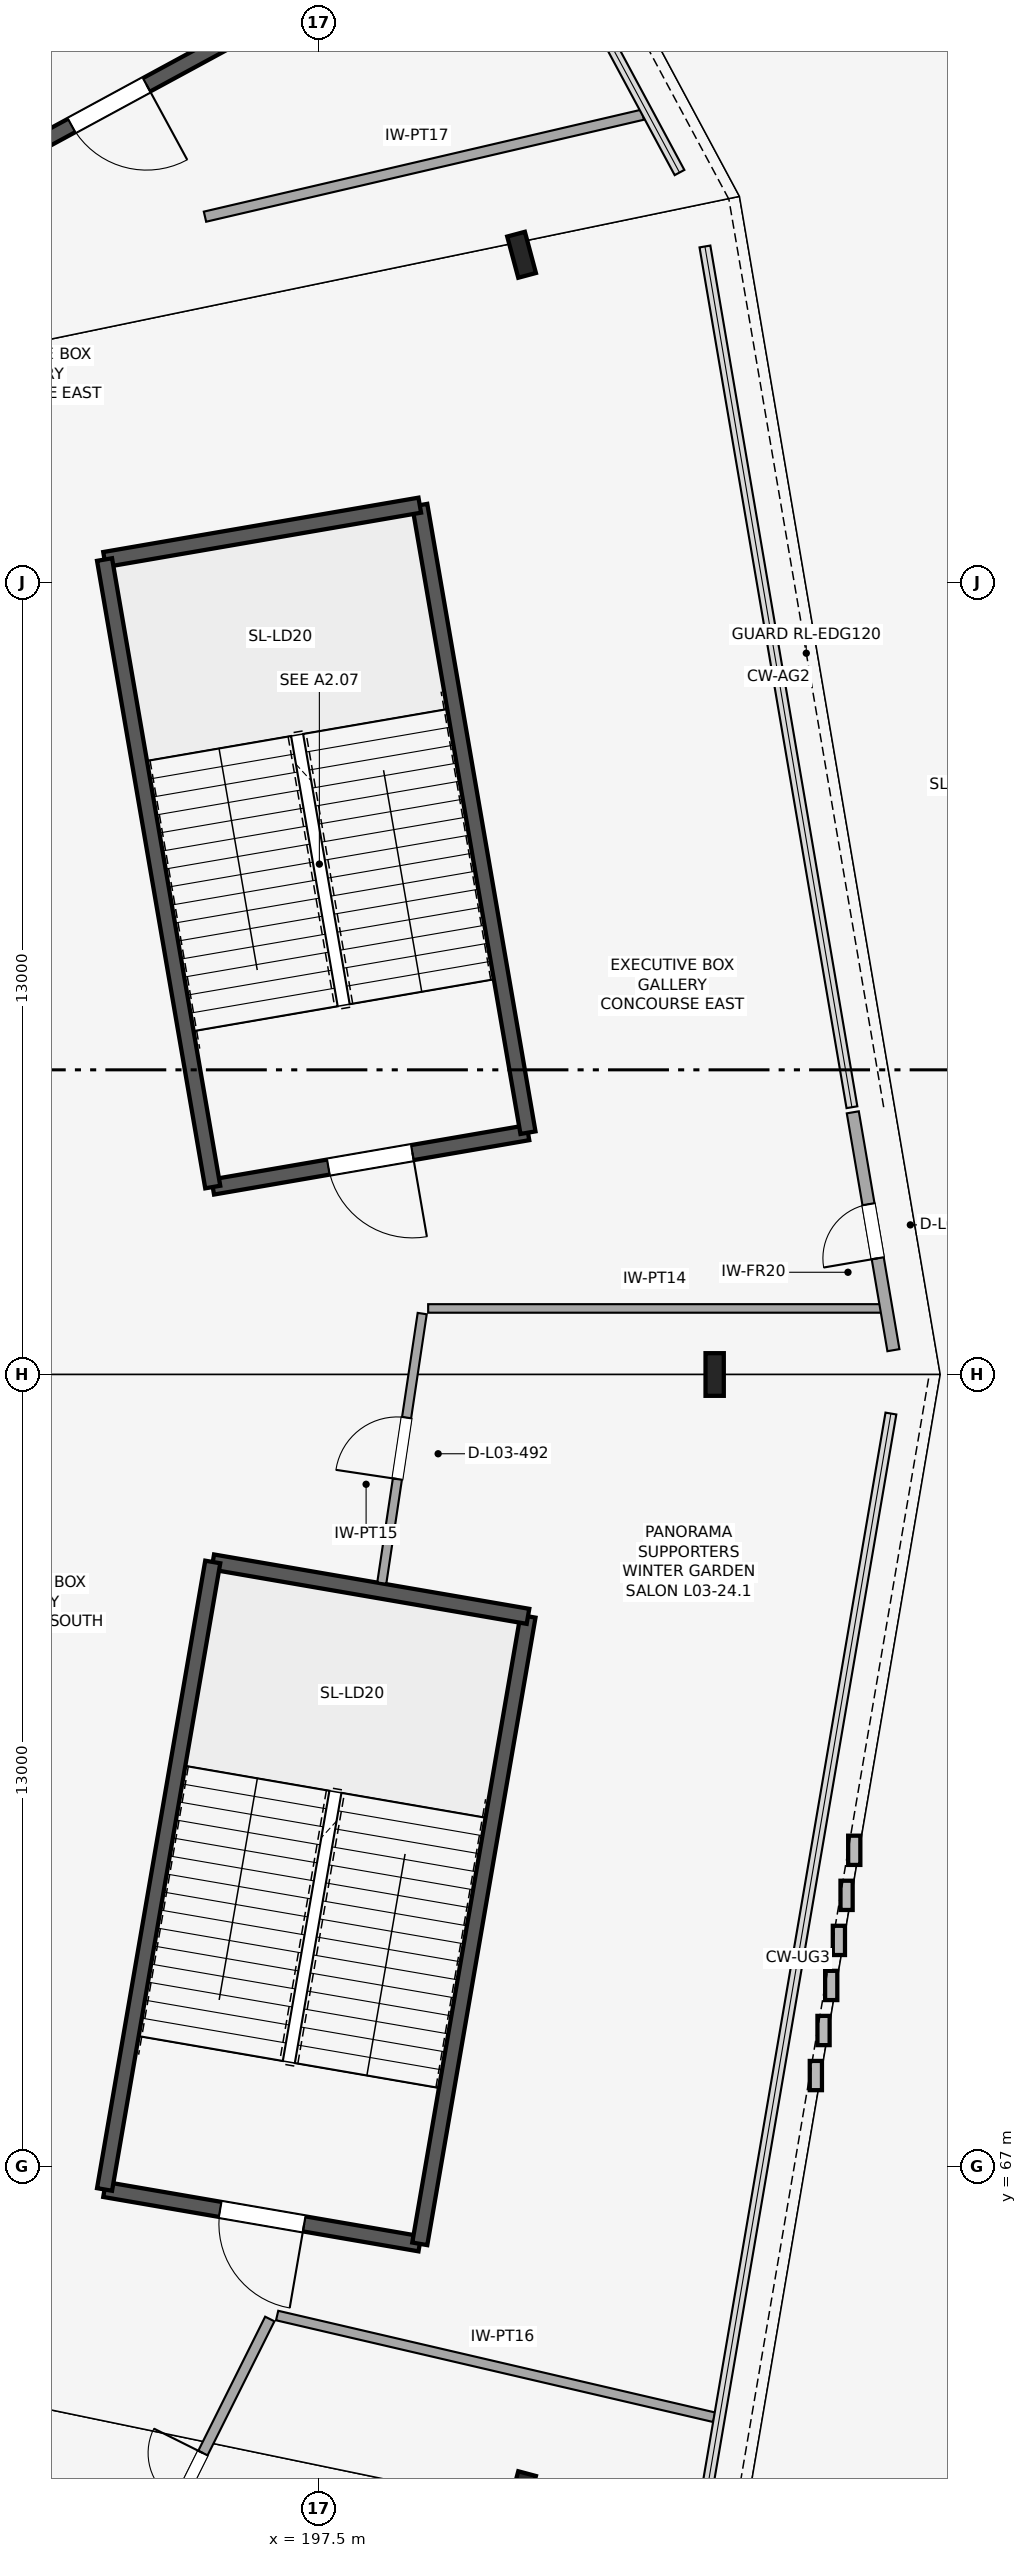
"""IFC4 building model, lengths in metres.
Left out: names, types, materials, properties, quantities, classifications, styles, units other than length and angle.
Written with IfcOpenShell. Run it as: python <this file> out.ifc"""

import sys

from ifc_helpers import new_model, si_unit, direction, frame, frame_2d, origin, origin_2d, place, context, subcontext, project, spatial, rectangle, i_section, extrude, element, fill, save


model = new_model("IFC4")
c1 = context("Model", 3, precision=1e-05, world=origin(), true_north=direction((0.0, 1.0)))
c2 = subcontext(c1, "Body", "Model", "MODEL_VIEW")
j1 = project(units=[si_unit("LENGTHUNIT", "METRE"), si_unit("PLANEANGLEUNIT", "RADIAN")], contexts=[c1])
p1 = place(None, origin())
s1 = spatial("IfcSite", under=j1, at=p1, CompositionType="ELEMENT")
p2 = place(p1, origin())
s2 = spatial("IfcBuilding", under=s1, at=p2, CompositionType="ELEMENT")
p3 = place(p2, frame((0.0, 0.0, 15.6)))
s3 = spatial("IfcBuildingStorey", under=s2, at=p3, CompositionType="ELEMENT", Elevation=15.6)
for number, where, z_axis, x_axis in (
    (1, (204.0, 80.0, 0.0), (0.0, 0.0, 1.0), (1.0, 0.0, 0.0)),
    (2, (200.831, 98.376, 0.0), (0.0, 0.0, 1.0), (0.966, 0.259, 0.0)),
    (3, (200.831, 61.624, 0.0), (0.0, 0.0, 1.0), (0.966, -0.259, 0.0)),
):
    element("IfcColumn", number, at=place(p3, frame(where, z_axis=z_axis, x_axis=x_axis)), inside=s3, PredefinedType="COLUMN", context=c2, shape_type="SweptSolid", body=[
        extrude(i_section(OverallWidth=0.3, OverallDepth=0.7, WebThickness=0.017, FlangeThickness=0.032, FilletRadius=0.027, at=origin_2d()), origin(), (0.0, 0.0, 1.0), 5.2),
    ])
p4 = place(p3, frame((195.762, 83.077, 0.0), z_axis=(0.0, 0.0, 1.0), x_axis=(0.985457162135, 0.16992404655, 0.0)))
e4 = element("IfcWall", 4, at=p4, inside=s3, PredefinedType="SHEAR", context=c2, shape_type="SweptSolid", body=[
    extrude(rectangle(XDim=5.25, YDim=0.25, at=frame_2d((2.625, 0.0))), origin(), (0.0, 0.0, 1.0), 4.9),
])
p5 = place(p4, frame((1.925, 0.0, 0.0)))
e5 = element("IfcOpeningElement", 5, at=p5, cuts=e4, PredefinedType="OPENING", context=c2, shape_type="SweptSolid", body=[
    extrude(rectangle(XDim=1.4, YDim=2.2, at=frame_2d((0.7, 1.1))), frame((0.0, 0.135, 0.0), z_axis=(0.0, -1.0, 0.0), x_axis=(1.0, 0.0, 0.0)), (0.0, 0.0, 1.0), 0.27),
])
p6 = place(p3, frame((200.936, 83.969, 0.0), z_axis=(0.0, 0.0, 1.0), x_axis=(-0.169938992676, 0.985454584833, 0.0)))
e6 = element("IfcWall", 6, at=p6, inside=s3, PredefinedType="SHEAR", context=c2, shape_type="SweptSolid", body=[
    extrude(rectangle(XDim=10.45, YDim=0.25, at=frame_2d((5.225, 0.0))), origin(), (0.0, 0.0, 1.0), 4.9),
])
p7 = place(p3, frame((199.16, 94.267, 0.0), z_axis=(0.0, 0.0, 1.0), x_axis=(-0.985457162135, -0.16992404655, 0.0)))
e7 = element("IfcWall", 7, at=p7, inside=s3, PredefinedType="SHEAR", context=c2, shape_type="SweptSolid", body=[
    extrude(rectangle(XDim=5.25, YDim=0.25, at=frame_2d((2.625, 0.0))), origin(), (0.0, 0.0, 1.0), 4.9),
])
p8 = place(p3, frame((193.987, 93.375, 0.0), z_axis=(0.0, 0.0, 1.0), x_axis=(0.169938992676, -0.985454584833, 0.0)))
e8 = element("IfcWall", 8, at=p8, inside=s3, PredefinedType="SHEAR", context=c2, shape_type="SweptSolid", body=[
    extrude(rectangle(XDim=10.45, YDim=0.25, at=frame_2d((5.225, 0.0))), origin(), (0.0, 0.0, 1.0), 4.9),
])
p9 = place(p3, frame((191.754, 99.58, 0.0), z_axis=(0.0, 0.0, 1.0), x_axis=(0.878961487093, 0.47689275965, 0.0)))
e9 = element("IfcWall", 9, at=p9, inside=s3, PredefinedType="SHEAR", context=c2, shape_type="SweptSolid", body=[
    extrude(rectangle(XDim=5.25, YDim=0.25, at=frame_2d((2.625, 0.0))), origin(), (0.0, 0.0, 1.0), 4.9),
])
p10 = place(p9, frame((1.925, 0.0, 0.0)))
e10 = element("IfcOpeningElement", 10, at=p10, cuts=e9, PredefinedType="OPENING", context=c2, shape_type="SweptSolid", body=[
    extrude(rectangle(XDim=1.4, YDim=2.2, at=frame_2d((0.7, 1.1))), frame((0.0, 0.135, 0.0), z_axis=(0.0, -1.0, 0.0), x_axis=(1.0, 0.0, 0.0)), (0.0, 0.0, 1.0), 0.27),
])
p11 = place(p3, frame((193.987, 66.625, 0.0), z_axis=(0.0, 0.0, 1.0), x_axis=(0.985457162135, -0.16992404655, 0.0)))
e11 = element("IfcWall", 11, at=p11, inside=s3, PredefinedType="SHEAR", context=c2, shape_type="SweptSolid", body=[
    extrude(rectangle(XDim=5.25, YDim=0.25, at=frame_2d((2.625, 0.0))), origin(), (0.0, 0.0, 1.0), 4.9),
])
p12 = place(p11, frame((1.925, 0.0, 0.0)))
e12 = element("IfcOpeningElement", 12, at=p12, cuts=e11, PredefinedType="OPENING", context=c2, shape_type="SweptSolid", body=[
    extrude(rectangle(XDim=1.4, YDim=2.2, at=frame_2d((0.7, 1.1))), frame((0.0, 0.135, 0.0), z_axis=(0.0, -1.0, 0.0), x_axis=(1.0, 0.0, 0.0)), (0.0, 0.0, 1.0), 0.27),
])
p13 = place(p3, frame((199.16, 65.733, 0.0), z_axis=(0.0, 0.0, 1.0), x_axis=(0.169938992676, 0.985454584833, 0.0)))
e13 = element("IfcWall", 13, at=p13, inside=s3, PredefinedType="SHEAR", context=c2, shape_type="SweptSolid", body=[
    extrude(rectangle(XDim=10.45, YDim=0.25, at=frame_2d((5.225, 0.0))), origin(), (0.0, 0.0, 1.0), 4.9),
])
p14 = place(p3, frame((200.936, 76.031, 0.0), z_axis=(0.0, 0.0, 1.0), x_axis=(-0.985458504796, 0.169916259745, 0.0)))
e14 = element("IfcWall", 14, at=p14, inside=s3, PredefinedType="SHEAR", context=c2, shape_type="SweptSolid", body=[
    extrude(rectangle(XDim=5.25, YDim=0.25, at=frame_2d((2.625, 0.0))), origin(), (0.0, 0.0, 1.0), 4.9),
])
p15 = place(p3, frame((195.762, 76.923, 0.0), z_axis=(0.0, 0.0, 1.0), x_axis=(-0.16991630471, -0.985458497043, 0.0)))
e15 = element("IfcWall", 15, at=p15, inside=s3, PredefinedType="SHEAR", context=c2, shape_type="SweptSolid", body=[
    extrude(rectangle(XDim=10.45, YDim=0.25, at=frame_2d((5.225, 0.0))), origin(), (0.0, 0.0, 1.0), 4.9),
])
p16 = place(p3, frame((195.635, 99.001, 0.0), z_axis=(0.0, 0.0, 1.0), x_axis=(0.973918293812, 0.226899001712, 0.0)))
e16 = element("IfcWall", 16, at=p16, inside=s3, PredefinedType="PARTITIONING", context=c2, shape_type="SweptSolid", body=[
    extrude(rectangle(XDim=7.377, YDim=0.17, at=frame_2d((3.688, 0.0))), origin(), (0.0, 0.0, 1.0), 2.45),
])
p17 = place(p3, frame((194.102, 59.294, 0.0), z_axis=(0.0, 0.0, 1.0), x_axis=(0.44637403409, 0.894846479397, 0.0)))
e17 = element("IfcWall", 17, at=p17, inside=s3, PredefinedType="PARTITIONING", context=c2, shape_type="SweptSolid", body=[
    extrude(rectangle(XDim=5.817, YDim=0.17, at=frame_2d((2.909, 0.0))), origin(), (0.0, 0.0, 1.0), 2.45),
])
p18 = place(p17, frame((2.459, 0.0, 0.0)))
e18 = element("IfcOpeningElement", 18, at=p18, cuts=e17, PredefinedType="OPENING", context=c2, shape_type="SweptSolid", body=[
    extrude(rectangle(XDim=0.9, YDim=2.24, at=frame_2d((0.45, 1.12))), frame((0.0, 0.095, 0.0), z_axis=(0.0, -1.0, 0.0), x_axis=(1.0, 0.0, 0.0)), (0.0, 0.0, 1.0), 0.19),
])
p19 = place(p3, frame((196.819, 64.556, 0.0), z_axis=(0.0, 0.0, 1.0), x_axis=(0.973969408775, -0.22667948908, 0.0)))
e19 = element("IfcWall", 19, at=p19, inside=s3, PredefinedType="PARTITIONING", context=c2, shape_type="SweptSolid", body=[
    extrude(rectangle(XDim=7.366, YDim=0.16, at=frame_2d((3.683, 0.0))), origin(), (0.0, 0.0, 1.0), 2.45),
])
p20 = place(p3, frame((198.537, 76.577, 0.0), z_axis=(0.0, 0.0, 1.0), x_axis=(0.148364476021, 0.988932749106, 0.0)))
e20 = element("IfcWall", 20, at=p20, inside=s3, PredefinedType="PARTITIONING", context=c2, shape_type="SweptSolid", body=[
    extrude(rectangle(XDim=4.473, YDim=0.15, at=frame_2d((2.236, 0.0))), origin(), (0.0, 0.0, 1.0), 2.45),
])
p21 = place(p20, frame((1.726, 0.0, 0.0)))
e21 = element("IfcOpeningElement", 21, at=p21, cuts=e20, PredefinedType="OPENING", context=c2, shape_type="SweptSolid", body=[
    extrude(rectangle(XDim=1.02, YDim=2.24, at=frame_2d((0.51, 1.12))), frame((0.0, 0.085, 0.0), z_axis=(0.0, -1.0, 0.0), x_axis=(1.0, 0.0, 0.0)), (0.0, 0.0, 1.0), 0.17),
])
p22 = place(p3, frame((199.298, 81.084, 0.0), z_axis=(0.0, 0.0, 1.0), x_axis=(0.999999999461, 3.2840722e-05, 0.0)))
e22 = element("IfcWall", 22, at=p22, inside=s3, PredefinedType="PARTITIONING", context=c2, shape_type="SweptSolid", body=[
    extrude(rectangle(XDim=7.434, YDim=0.14, at=frame_2d((3.717, 0.0))), origin(), (0.0, 0.0, 1.0), 2.45),
])
p23 = place(p3, frame((206.934, 80.399, 0.0), z_axis=(0.0, 0.0, 1.0), x_axis=(-0.16836659398, 0.985724449342, 0.0)))
e23 = element("IfcWall", 23, at=p23, inside=s3, PredefinedType="PARTITIONING", context=c2, shape_type="SweptSolid", body=[
    extrude(rectangle(XDim=3.96, YDim=0.2, at=frame_2d((1.98, 0.0))), origin(), (0.0, 0.0, 1.0), 2.45),
])
p24 = place(p23, frame((1.53, 0.0, 0.0)))
e24 = element("IfcOpeningElement", 24, at=p24, cuts=e23, PredefinedType="OPENING", context=c2, shape_type="SweptSolid", body=[
    extrude(rectangle(XDim=0.9, YDim=2.24, at=frame_2d((0.45, 1.12))), frame((0.0, 0.11, 0.0), z_axis=(0.0, -1.0, 0.0), x_axis=(1.0, 0.0, 0.0)), (0.0, 0.0, 1.0), 0.22),
])
p25 = place(p5, frame((1.4, 0.0, 0.0), z_axis=(0.0, 0.0, 1.0), x_axis=(-1.0, 0.0, 0.0)))
e25 = element("IfcDoor", 25, at=p25, inside=s3, OperationType="SINGLE_SWING_LEFT", PredefinedType="DOOR", context=c2, shape_type="SweptSolid", body=[
    extrude(rectangle(XDim=1.4, YDim=2.2, at=frame_2d((0.7, 1.1))), frame((0.0, 0.025, 0.0), z_axis=(0.0, -1.0, 0.0), x_axis=(1.0, 0.0, 0.0)), (0.0, 0.0, 1.0), 0.05),
])
fill(e5, e25)
p26 = place(p10, frame((1.4, 0.0, 0.0), z_axis=(0.0, 0.0, 1.0), x_axis=(-1.0, 0.0, 0.0)))
e26 = element("IfcDoor", 26, at=p26, inside=s3, OperationType="SINGLE_SWING_LEFT", PredefinedType="DOOR", context=c2, shape_type="SweptSolid", body=[
    extrude(rectangle(XDim=1.4, YDim=2.2, at=frame_2d((0.7, 1.1))), frame((0.0, 0.025, 0.0), z_axis=(0.0, -1.0, 0.0), x_axis=(1.0, 0.0, 0.0)), (0.0, 0.0, 1.0), 0.05),
])
fill(e10, e26)
p27 = place(p12, frame((1.4, 0.0, 0.0), z_axis=(0.0, 0.0, 1.0), x_axis=(-1.0, 0.0, 0.0)))
e27 = element("IfcDoor", 27, at=p27, inside=s3, OperationType="SINGLE_SWING_LEFT", PredefinedType="DOOR", context=c2, shape_type="SweptSolid", body=[
    extrude(rectangle(XDim=1.4, YDim=2.2, at=frame_2d((0.7, 1.1))), frame((0.0, 0.025, 0.0), z_axis=(0.0, -1.0, 0.0), x_axis=(1.0, 0.0, 0.0)), (0.0, 0.0, 1.0), 0.05),
])
fill(e12, e27)
p28 = place(p18, origin())
e28 = element("IfcDoor", 28, at=p28, inside=s3, OperationType="SINGLE_SWING_RIGHT", PredefinedType="DOOR", context=c2, shape_type="SweptSolid", body=[
    extrude(rectangle(XDim=0.9, YDim=2.24, at=frame_2d((0.45, 1.12))), frame((0.0, 0.025, 0.0), z_axis=(0.0, -1.0, 0.0), x_axis=(1.0, 0.0, 0.0)), (0.0, 0.0, 1.0), 0.05),
])
fill(e18, e28)
p29 = place(p21, origin())
e29 = element("IfcDoor", 29, at=p29, inside=s3, OperationType="SINGLE_SWING_LEFT", PredefinedType="DOOR", context=c2, shape_type="SweptSolid", body=[
    extrude(rectangle(XDim=1.02, YDim=2.24, at=frame_2d((0.51, 1.12))), frame((0.0, 0.025, 0.0), z_axis=(0.0, -1.0, 0.0), x_axis=(1.0, 0.0, 0.0)), (0.0, 0.0, 1.0), 0.05),
])
fill(e21, e29)
p30 = place(p24, origin())
e30 = element("IfcDoor", 30, at=p30, inside=s3, OperationType="SINGLE_SWING_LEFT", PredefinedType="DOOR", context=c2, shape_type="SweptSolid", body=[
    extrude(rectangle(XDim=0.9, YDim=2.24, at=frame_2d((0.45, 1.12))), frame((0.0, 0.025, 0.0), z_axis=(0.0, -1.0, 0.0), x_axis=(1.0, 0.0, 0.0)), (0.0, 0.0, 1.0), 0.05),
])
fill(e24, e30)
save(model, sys.argv[1])
